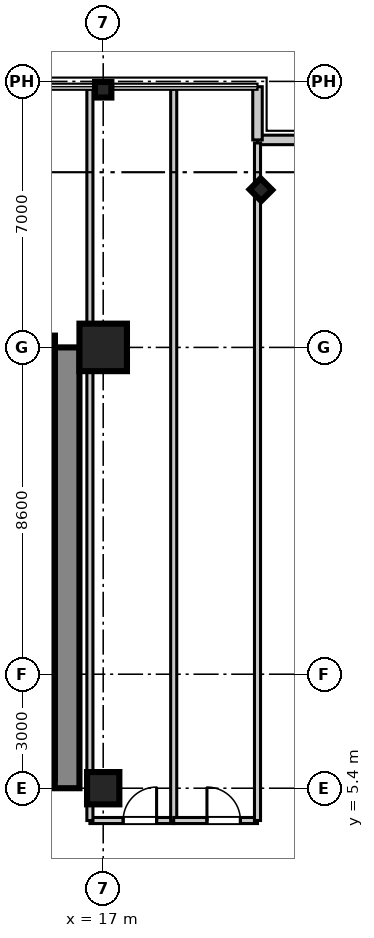
"""IFC4 building model, lengths in metres.
Left out: names, types, materials, properties, quantities, classifications, styles, units other than length and angle.
Written with IfcOpenShell. Run it as: python <this file> out.ifc"""

import sys

from ifc_helpers import new_model, si_unit, direction, frame, frame_2d, origin, origin_2d, place, context, subcontext, project, spatial, rectangle, i_section, extrude, source, transform, mapped, element, fill, save


model = new_model("IFC4")
c1 = context("Model", 3, precision=1e-05, world=origin(), true_north=direction((0.0, 1.0)))
c2 = subcontext(c1, "Body", "Model", "MODEL_VIEW")
j1 = project(units=[si_unit("LENGTHUNIT", "METRE"), si_unit("PLANEANGLEUNIT", "RADIAN")], contexts=[c1])
p1 = place(None, origin())
s1 = spatial("IfcSite", under=j1, at=p1, CompositionType="ELEMENT")
p2 = place(p1, origin())
s2 = spatial("IfcBuilding", under=s1, at=p2, CompositionType="ELEMENT")
p3 = place(p2, frame((0.0, 0.0, 117.5)))
s3 = spatial("IfcBuildingStorey", under=s2, at=p3, CompositionType="ELEMENT", Elevation=117.5)
m1 = source(origin(), c2, "Body", "SweptSolid", [
    extrude(rectangle(XDim=0.85, YDim=0.85, at=origin_2d()), origin(), (0.0, 0.0, 1.0), 3.605),
])
p4 = place(p3, frame((17.0, 5.4, 0.0), z_axis=(0.0, 0.0, 1.0), x_axis=(1.0, 0.0, 0.0)))
e1 = element("IfcColumn", 1, at=p4, inside=s3, PredefinedType="PILASTER", context=c2, shape_type="MappedRepresentation", body=[
    mapped(m1, transform((0.0, 0.0, 0.0), scale=1.0)),
])
m2 = source(origin(), c2, "Body", "SweptSolid", [
    extrude(rectangle(XDim=1.25, YDim=1.25, at=origin_2d()), origin(), (0.0, 0.0, 1.0), 3.605),
])
p5 = place(p3, frame((17.0, 17.0, 0.0), z_axis=(0.0, 0.0, 1.0), x_axis=(1.0, 0.0, 0.0)))
e2 = element("IfcColumn", 2, at=p5, inside=s3, PredefinedType="COLUMN", context=c2, shape_type="MappedRepresentation", body=[
    mapped(m2, transform((0.0, 0.0, 0.0), scale=1.0)),
])
m3 = source(origin(), c2, "Body", "SweptSolid", [
    extrude(i_section(OverallWidth=0.409, OverallDepth=0.43, WebThickness=0.021, FlangeThickness=0.034, at=origin_2d()), origin(), (0.0, 0.0, 1.0), 3.605),
])
for number, where, z_axis, x_axis in (
    (3, (17.0, 23.78, 0.0), (0.0, 0.0, 1.0), (0.0, 1.0, 0.0)),
    (4, (21.15, 21.15, 0.0), (0.0, 0.0, 1.0), (0.707, 0.707, 0.0)),
):
    element("IfcColumn", number, at=place(p3, frame(where, z_axis=z_axis, x_axis=x_axis)), inside=s3, PredefinedType="COLUMN", context=c2, shape_type="MappedRepresentation", body=[
        mapped(m3, transform((0.0, 0.0, 0.0), scale=1.0)),
    ])
m4 = source(origin(), c2, "Body", "SweptSolid", [
    extrude(rectangle(XDim=11.6, YDim=0.65, at=frame_2d((5.8, 0.0))), origin(), (0.0, 0.0, 1.0), 3.38),
])
p6 = place(p3, frame((16.05, 5.4, 0.0), z_axis=(0.0, 0.0, 1.0), x_axis=(0.0, 1.0, 0.0)))
e5 = element("IfcWall", 5, at=p6, inside=s3, PredefinedType="SHEAR", context=c2, shape_type="MappedRepresentation", body=[
    mapped(m4, transform((0.0, 0.0, 0.0), scale=1.0)),
])
m5 = source(origin(), c2, "Body", "SweptSolid", [
    extrude(rectangle(XDim=2.36, YDim=0.22, at=frame_2d((1.18, 0.0))), origin(), (0.0, 0.0, 1.0), 3.38),
])
p7 = place(p3, frame((15.62, 5.64, 0.0), z_axis=(0.0, 0.0, 1.0), x_axis=(0.0, 1.0, 0.0)))
e6 = element("IfcWall", 6, at=p7, inside=s3, PredefinedType="SHEAR", context=c2, shape_type="MappedRepresentation", body=[
    mapped(m5, transform((0.0, 0.0, 0.0), scale=1.0)),
])
m6 = source(origin(), c2, "Body", "SweptSolid", [
    extrude(rectangle(XDim=2.2, YDim=0.22, at=frame_2d((1.1, 0.0))), origin(), (0.0, 0.0, 1.0), 3.38),
])
for number, where, z_axis, x_axis in (
    (7, (15.62, 8.0, 0.0), (0.0, 0.0, 1.0), (0.0, 1.0, 0.0)),
    (8, (15.62, 10.2, 0.0), (0.0, 0.0, 1.0), (0.0, 1.0, 0.0)),
):
    element("IfcWall", number, at=place(p3, frame(where, z_axis=z_axis, x_axis=x_axis)), inside=s3, PredefinedType="SHEAR", context=c2, shape_type="MappedRepresentation", body=[
        mapped(m6, transform((0.0, 0.0, 0.0), scale=1.0)),
    ])
m7 = source(origin(), c2, "Body", "SweptSolid", [
    extrude(rectangle(XDim=2.3, YDim=0.22, at=frame_2d((1.15, 0.0))), origin(), (0.0, 0.0, 1.0), 3.38),
])
p8 = place(p3, frame((15.62, 12.4, 0.0), z_axis=(0.0, 0.0, 1.0), x_axis=(0.0, 1.0, 0.0)))
e9 = element("IfcWall", 9, at=p8, inside=s3, PredefinedType="SHEAR", context=c2, shape_type="MappedRepresentation", body=[
    mapped(m7, transform((0.0, 0.0, 0.0), scale=1.0)),
])
m8 = source(origin(), c2, "Body", "SweptSolid", [
    extrude(rectangle(XDim=2.61, YDim=0.22, at=frame_2d((1.305, 0.0))), origin(), (0.0, 0.0, 1.0), 3.38),
])
p9 = place(p3, frame((15.62, 14.7, 0.0), z_axis=(0.0, 0.0, 1.0), x_axis=(0.0, 1.0, 0.0)))
e10 = element("IfcWall", 10, at=p9, inside=s3, PredefinedType="SHEAR", context=c2, shape_type="MappedRepresentation", body=[
    mapped(m8, transform((0.0, 0.0, 0.0), scale=1.0)),
])
m9 = source(origin(), c2, "Body", "SweptSolid", [
    extrude(rectangle(XDim=1.4, YDim=0.25, at=frame_2d((0.7, 0.0))), origin(), (0.0, 0.0, 1.0), 3.38),
])
p10 = place(p3, frame((21.06, 22.46, 0.0), z_axis=(0.0, 0.0, 1.0), x_axis=(1.0, 0.0, 0.0)))
e11 = element("IfcWall", 11, at=p10, inside=s3, PredefinedType="STANDARD", context=c2, shape_type="MappedRepresentation", body=[
    mapped(m9, transform((0.0, 0.0, 0.0), scale=1.0)),
])
m10 = source(origin(), c2, "Body", "SweptSolid", [
    extrude(rectangle(XDim=1.4, YDim=0.25, at=frame_2d((0.7, 0.0))), origin(), (0.0, 0.0, 1.0), 3.38),
])
p11 = place(p3, frame((21.06, 22.46, 0.0), z_axis=(0.0, 0.0, 1.0), x_axis=(0.0, 1.0, 0.0)))
e12 = element("IfcWall", 12, at=p11, inside=s3, PredefinedType="STANDARD", context=c2, shape_type="MappedRepresentation", body=[
    mapped(m10, transform((0.0, 0.0, 0.0), scale=1.0)),
])
m11 = source(origin(), c2, "Body", "SweptSolid", [
    extrude(rectangle(XDim=2.205, YDim=0.16, at=frame_2d((1.103, 0.0))), origin(), (0.0, 0.0, 1.0), 2.72),
])
p12 = place(p3, frame((16.65, 4.55, 0.0), z_axis=(0.0, 0.0, 1.0), x_axis=(1.0, 0.0, 0.0)))
e13 = element("IfcWall", 13, at=p12, inside=s3, PredefinedType="PARTITIONING", context=c2, shape_type="MappedRepresentation", body=[
    mapped(m11, transform((0.0, 0.0, 0.0), scale=1.0)),
])
p13 = place(p12, frame((0.875, 0.0, 0.0)))
e14 = element("IfcOpeningElement", 14, at=p13, cuts=e13, PredefinedType="OPENING", context=c2, shape_type="SweptSolid", body=[
    extrude(rectangle(XDim=0.88, YDim=2.1, at=frame_2d((0.44, 1.05))), frame((0.0, 0.09, 0.0), z_axis=(0.0, -1.0, 0.0), x_axis=(1.0, 0.0, 0.0)), (0.0, 0.0, 1.0), 0.18),
])
m12 = source(origin(), c2, "Body", "SweptSolid", [
    extrude(rectangle(XDim=19.25, YDim=0.16, at=frame_2d((9.625, 0.0))), origin(), (0.0, 0.0, 1.0), 2.72),
])
for number, where, z_axis, x_axis in (
    (15, (16.65, 4.55, 0.0), (0.0, 0.0, 1.0), (0.0, 1.0, 0.0)),
    (16, (18.855, 4.55, 0.0), (0.0, 0.0, 1.0), (0.0, 1.0, 0.0)),
):
    element("IfcWall", number, at=place(p3, frame(where, z_axis=z_axis, x_axis=x_axis)), inside=s3, PredefinedType="PARTITIONING", context=c2, shape_type="MappedRepresentation", body=[
        mapped(m12, transform((0.0, 0.0, 0.0), scale=1.0)),
    ])
p14 = place(p3, frame((18.855, 4.55, 0.0), z_axis=(0.0, 0.0, 1.0), x_axis=(1.0, 0.0, 0.0)))
e17 = element("IfcWall", 17, at=p14, inside=s3, PredefinedType="PARTITIONING", context=c2, shape_type="MappedRepresentation", body=[
    mapped(m11, transform((0.0, 0.0, 0.0), scale=1.0)),
])
p15 = place(p14, frame((0.875, 0.0, 0.0)))
e18 = element("IfcOpeningElement", 18, at=p15, cuts=e17, PredefinedType="OPENING", context=c2, shape_type="SweptSolid", body=[
    extrude(rectangle(XDim=0.88, YDim=2.1, at=frame_2d((0.44, 1.05))), frame((0.0, 0.09, 0.0), z_axis=(0.0, -1.0, 0.0), x_axis=(1.0, 0.0, 0.0)), (0.0, 0.0, 1.0), 0.18),
])
m13 = source(origin(), c2, "Body", "SweptSolid", [
    extrude(rectangle(XDim=17.83, YDim=0.16, at=frame_2d((8.915, 0.0))), origin(), (0.0, 0.0, 1.0), 2.72),
])
p16 = place(p3, frame((21.06, 4.55, 0.0), z_axis=(0.0, 0.0, 1.0), x_axis=(0.0, 1.0, 0.0)))
e19 = element("IfcWall", 19, at=p16, inside=s3, PredefinedType="PARTITIONING", context=c2, shape_type="MappedRepresentation", body=[
    mapped(m13, transform((0.0, 0.0, 0.0), scale=1.0)),
])
m14 = source(origin(), c2, "Body", "SweptSolid", [
    extrude(rectangle(XDim=0.88, YDim=2.1, at=frame_2d((0.44, 1.05))), frame((0.0, 0.025, 0.0), z_axis=(0.0, -1.0, 0.0), x_axis=(1.0, 0.0, 0.0)), (0.0, 0.0, 1.0), 0.05),
])
p17 = place(p13, origin())
e20 = element("IfcDoor", 20, at=p17, inside=s3, OperationType="SINGLE_SWING_RIGHT", PredefinedType="DOOR", context=c2, shape_type="MappedRepresentation", body=[
    mapped(m14, transform((0.0, 0.0, 0.0), scale=1.0)),
])
fill(e14, e20)
p18 = place(p15, origin())
e21 = element("IfcDoor", 21, at=p18, inside=s3, OperationType="SINGLE_SWING_LEFT", PredefinedType="DOOR", context=c2, shape_type="MappedRepresentation", body=[
    mapped(m14, transform((0.0, 0.0, 0.0), scale=1.0)),
])
fill(e18, e21)
save(model, sys.argv[1])
